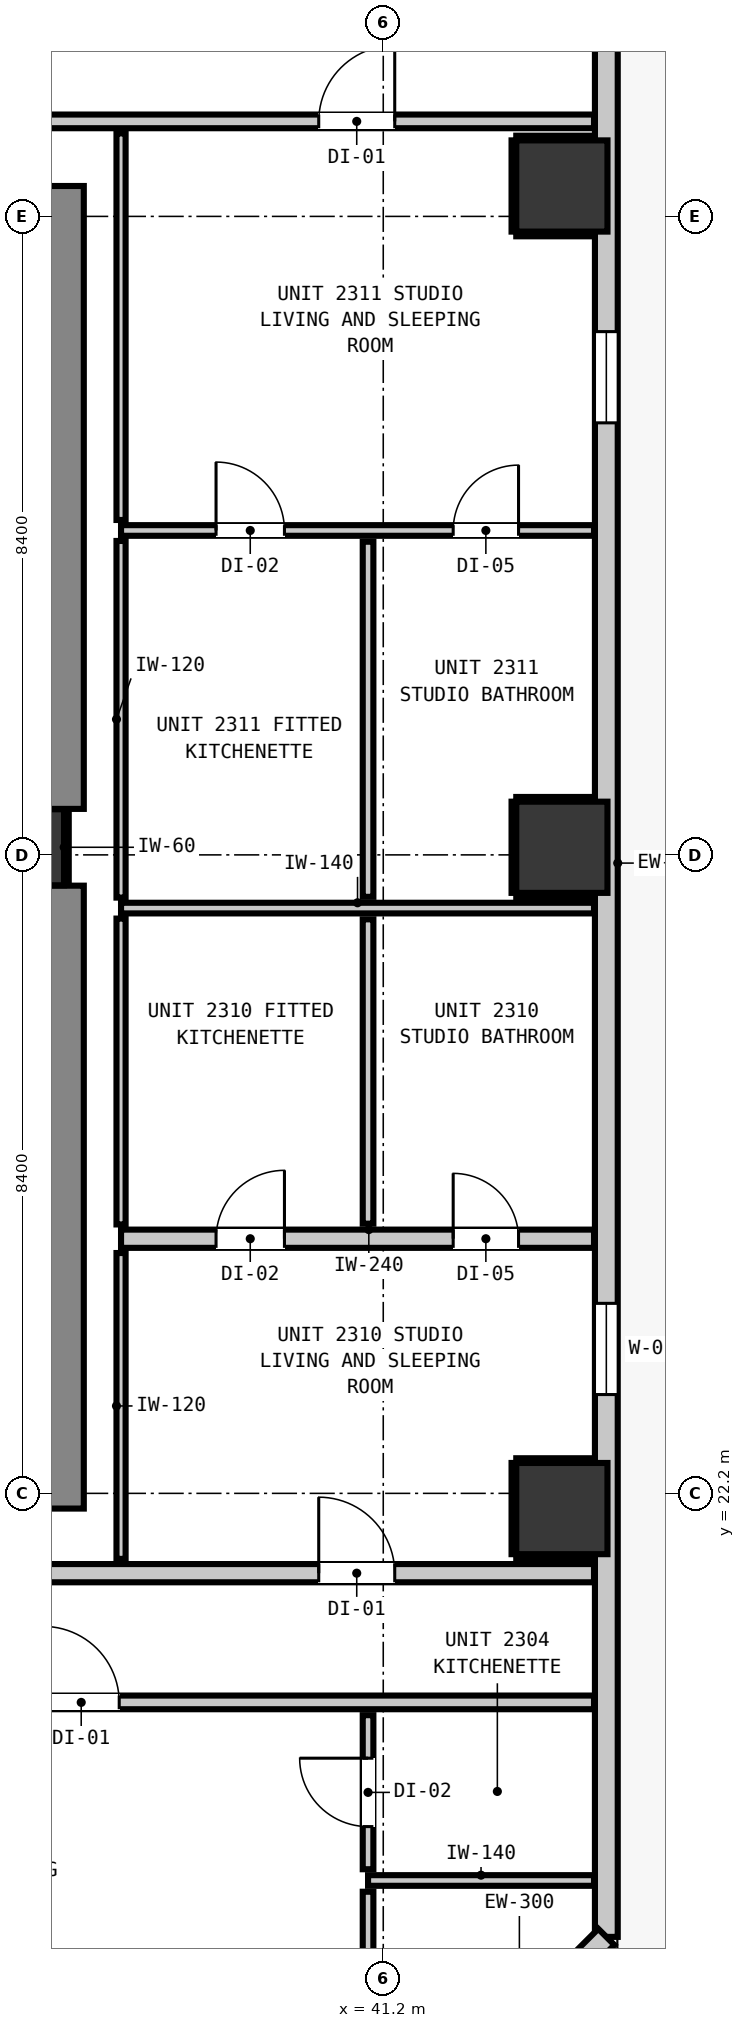
"""IFC4 building model, lengths in metres.
Left out: names, types, materials, properties, quantities, classifications, styles, units other than length and angle.
Written with IfcOpenShell. Run it as: python <this file> out.ifc"""

import sys

from ifc_helpers import new_model, si_unit, direction, frame, frame_2d, origin, origin_2d, place, context, subcontext, project, spatial, rectangle, extrude, element, fill, save


model = new_model("IFC4")
c1 = context("Model", 3, precision=1e-05, world=origin(), true_north=direction((0.0, 1.0)))
c2 = subcontext(c1, "Body", "Model", "MODEL_VIEW")
j1 = project(units=[si_unit("LENGTHUNIT", "METRE"), si_unit("PLANEANGLEUNIT", "RADIAN")], contexts=[c1])
p1 = place(None, origin())
s1 = spatial("IfcSite", under=j1, at=p1, CompositionType="ELEMENT")
p2 = place(p1, origin())
s2 = spatial("IfcBuilding", under=s1, at=p2, CompositionType="ELEMENT")
p3 = place(p2, frame((0.0, 0.0, 81.76)))
s3 = spatial("IfcBuildingStorey", under=s2, at=p3, CompositionType="ELEMENT", Elevation=81.76)
p4 = place(p3, frame((36.5, 30.7, 0.0), z_axis=(0.0, 0.0, 1.0), x_axis=(1.0, 0.0, 0.0)))
e1 = element("IfcColumn", 1, at=p4, inside=s3, PredefinedType="COLUMN", context=c2, shape_type="SweptSolid", body=[
    extrude(rectangle(XDim=1.0, YDim=1.0, at=origin_2d()), origin(), (0.0, 0.0, 1.0), 3.32),
])
p5 = place(p3, frame((36.66, 22.0, 0.0), z_axis=(0.0, 0.0, 1.0), x_axis=(0.0, 1.0, 0.0)))
e2 = element("IfcWall", 2, at=p5, inside=s3, PredefinedType="SHEAR", context=c2, shape_type="SweptSolid", body=[
    extrude(rectangle(XDim=8.195, YDim=1.2, at=frame_2d((4.098, 0.0))), origin(), (0.0, 0.0, 1.0), 3.32),
])
p6 = place(p3, frame((36.66, 31.205, 0.0), z_axis=(0.0, 0.0, 1.0), x_axis=(0.0, 1.0, 0.0)))
e3 = element("IfcWall", 3, at=p6, inside=s3, PredefinedType="SHEAR", context=c2, shape_type="SweptSolid", body=[
    extrude(rectangle(XDim=8.195, YDim=1.2, at=frame_2d((4.097, 0.0))), origin(), (0.0, 0.0, 1.0), 3.32),
])
for number, where, z_axis, x_axis in (
    (4, (43.55, 22.0, -0.2), (0.0, 0.0, 1.0), (1.0, 0.0, 0.0)),
    (5, (43.55, 30.7, -0.2), (0.0, 0.0, 1.0), (1.0, 0.0, 0.0)),
    (6, (43.55, 39.4, -0.2), (0.0, 0.0, 1.0), (1.0, 0.0, 0.0)),
):
    element("IfcColumn", number, at=place(p3, frame(where, z_axis=z_axis, x_axis=x_axis)), inside=s3, PredefinedType="COLUMN", context=c2, shape_type="SweptSolid", body=[
        extrude(rectangle(XDim=1.2, YDim=1.2, at=origin_2d()), origin(), (0.0, 0.0, 1.0), 3.52),
    ])
p7 = place(p3, frame((44.135, 51.035, 0.0), z_axis=(0.0, 0.0, 1.0), x_axis=(0.0, -1.0, 0.0)))
e7 = element("IfcWall", 7, at=p7, inside=s3, PredefinedType="STANDARD", context=c2, shape_type="SweptSolid", body=[
    extrude(rectangle(XDim=34.67, YDim=0.3, at=frame_2d((17.335, 0.0))), origin(), (0.0, 0.0, 1.0), 3.06),
])
p8 = place(p7, frame((0.501, 0.0, 0.0)))
e8 = element("IfcOpeningElement", 8, at=p8, cuts=e7, PredefinedType="OPENING", context=c2, shape_type="SweptSolid", body=[
    extrude(rectangle(XDim=1.1, YDim=2.15, at=frame_2d((0.55, 1.075))), frame((0.0, 0.16, 0.0), z_axis=(0.0, -1.0, 0.0), x_axis=(1.0, 0.0, 0.0)), (0.0, 0.0, 1.0), 0.32),
])
p9 = place(p7, frame((1.978, 0.0, 0.85)))
e9 = element("IfcOpeningElement", 9, at=p9, cuts=e7, PredefinedType="OPENING", context=c2, shape_type="SweptSolid", body=[
    extrude(rectangle(XDim=0.58, YDim=1.5, at=frame_2d((0.29, 0.75))), frame((0.0, 0.16, 0.0), z_axis=(0.0, -1.0, 0.0), x_axis=(1.0, 0.0, 0.0)), (0.0, 0.0, 1.0), 0.32),
])
p10 = place(p7, frame((26.335, 0.0, 0.85)))
e10 = element("IfcOpeningElement", 10, at=p10, cuts=e7, PredefinedType="OPENING", context=c2, shape_type="SweptSolid", body=[
    extrude(rectangle(XDim=1.2, YDim=1.8, at=frame_2d((0.6, 0.9))), frame((0.0, 0.16, 0.0), z_axis=(0.0, -1.0, 0.0), x_axis=(1.0, 0.0, 0.0)), (0.0, 0.0, 1.0), 0.32),
])
p11 = place(p7, frame((13.551, 0.0, 0.85)))
e11 = element("IfcOpeningElement", 11, at=p11, cuts=e7, PredefinedType="OPENING", context=c2, shape_type="SweptSolid", body=[
    extrude(rectangle(XDim=1.2, YDim=1.8, at=frame_2d((0.6, 0.9))), frame((0.0, 0.16, 0.0), z_axis=(0.0, -1.0, 0.0), x_axis=(1.0, 0.0, 0.0)), (0.0, 0.0, 1.0), 0.32),
])
p12 = place(p3, frame((44.135, 16.365, 0.0), z_axis=(0.0, 0.0, 1.0), x_axis=(-0.707106781187, -0.707106781187, 0.0)))
e12 = element("IfcWall", 12, at=p12, inside=s3, PredefinedType="STANDARD", context=c2, shape_type="SweptSolid", body=[
    extrude(rectangle(XDim=3.536, YDim=0.3, at=frame_2d((1.768, 0.0))), origin(), (0.0, 0.0, 1.0), 3.06),
])
p13 = place(p3, frame((12.993, 21.15, 0.0), z_axis=(0.0, 0.0, 1.0), x_axis=(1.0, 0.0, 0.0)))
e13 = element("IfcWall", 13, at=p13, inside=s3, PredefinedType="PARTITIONING", context=c2, shape_type="SweptSolid", body=[
    extrude(rectangle(XDim=30.98, YDim=0.24, at=frame_2d((15.49, 0.0))), origin(), (0.0, 0.0, 1.0), 3.06),
])
p14 = place(p13, frame((5.217, 0.0, 0.0)))
e14 = element("IfcOpeningElement", 14, at=p14, cuts=e13, PredefinedType="OPENING", context=c2, shape_type="SweptSolid", body=[
    extrude(rectangle(XDim=1.1, YDim=2.15, at=frame_2d((0.55, 1.075))), frame((0.0, 0.13, 0.0), z_axis=(0.0, -1.0, 0.0), x_axis=(1.0, 0.0, 0.0)), (0.0, 0.0, 1.0), 0.26),
])
p15 = place(p13, frame((27.358, 0.0, 0.0)))
e15 = element("IfcOpeningElement", 15, at=p15, cuts=e13, PredefinedType="OPENING", context=c2, shape_type="SweptSolid", body=[
    extrude(rectangle(XDim=1.0, YDim=2.15, at=frame_2d((0.5, 1.075))), frame((0.0, 0.13, 0.0), z_axis=(0.0, -1.0, 0.0), x_axis=(1.0, 0.0, 0.0)), (0.0, 0.0, 1.0), 0.26),
])
p16 = place(p3, frame((37.75, 25.55, 0.0), z_axis=(0.0, 0.0, 1.0), x_axis=(1.0, 0.0, 0.0)))
e16 = element("IfcWall", 16, at=p16, inside=s3, PredefinedType="PARTITIONING", context=c2, shape_type="SweptSolid", body=[
    extrude(rectangle(XDim=6.223, YDim=0.24, at=frame_2d((3.111, 0.0))), origin(), (0.0, 0.0, 1.0), 3.06),
])
p17 = place(p16, frame((1.25, 0.0, 0.0)))
e17 = element("IfcOpeningElement", 17, at=p17, cuts=e16, PredefinedType="OPENING", context=c2, shape_type="SweptSolid", body=[
    extrude(rectangle(XDim=0.9, YDim=2.1, at=frame_2d((0.45, 1.05))), frame((0.0, 0.13, 0.0), z_axis=(0.0, -1.0, 0.0), x_axis=(1.0, 0.0, 0.0)), (0.0, 0.0, 1.0), 0.26),
])
p18 = place(p16, frame((4.37, 0.0, 0.0)))
e18 = element("IfcOpeningElement", 18, at=p18, cuts=e16, PredefinedType="OPENING", context=c2, shape_type="SweptSolid", body=[
    extrude(rectangle(XDim=0.86, YDim=2.02, at=frame_2d((0.43, 1.01))), frame((0.0, 0.13, 0.0), z_axis=(0.0, -1.0, 0.0), x_axis=(1.0, 0.0, 0.0)), (0.0, 0.0, 1.0), 0.26),
])
p19 = place(p3, frame((12.993, 19.45, 0.0), z_axis=(0.0, 0.0, 1.0), x_axis=(1.0, 0.0, 0.0)))
e19 = element("IfcWall", 19, at=p19, inside=s3, PredefinedType="PARTITIONING", context=c2, shape_type="SweptSolid", body=[
    extrude(rectangle(XDim=30.98, YDim=0.18, at=frame_2d((15.49, 0.0))), origin(), (0.0, 0.0, 1.0), 3.06),
])
p20 = place(p19, frame((6.788, 0.0, 0.0)))
e20 = element("IfcOpeningElement", 20, at=p20, cuts=e19, PredefinedType="OPENING", context=c2, shape_type="SweptSolid", body=[
    extrude(rectangle(XDim=1.0, YDim=2.15, at=frame_2d((0.5, 1.075))), frame((0.0, 0.1, 0.0), z_axis=(0.0, -1.0, 0.0), x_axis=(1.0, 0.0, 0.0)), (0.0, 0.0, 1.0), 0.2),
])
p21 = place(p19, frame((16.356, 0.0, 0.0)))
e21 = element("IfcOpeningElement", 21, at=p21, cuts=e19, PredefinedType="OPENING", context=c2, shape_type="SweptSolid", body=[
    extrude(rectangle(XDim=1.0, YDim=2.15, at=frame_2d((0.5, 1.075))), frame((0.0, 0.1, 0.0), z_axis=(0.0, -1.0, 0.0), x_axis=(1.0, 0.0, 0.0)), (0.0, 0.0, 1.0), 0.2),
])
p22 = place(p19, frame((23.733, 0.0, 0.0)))
e22 = element("IfcOpeningElement", 22, at=p22, cuts=e19, PredefinedType="OPENING", context=c2, shape_type="SweptSolid", body=[
    extrude(rectangle(XDim=1.0, YDim=2.15, at=frame_2d((0.5, 1.075))), frame((0.0, 0.1, 0.0), z_axis=(0.0, -1.0, 0.0), x_axis=(1.0, 0.0, 0.0)), (0.0, 0.0, 1.0), 0.2),
])
p23 = place(p3, frame((1.827, 40.25, 0.0), z_axis=(0.0, 0.0, 1.0), x_axis=(1.0, 0.0, 0.0)))
e23 = element("IfcWall", 23, at=p23, inside=s3, PredefinedType="PARTITIONING", context=c2, shape_type="SweptSolid", body=[
    extrude(rectangle(XDim=42.146, YDim=0.18, at=frame_2d((21.073, 0.0))), origin(), (0.0, 0.0, 1.0), 3.06),
])
p24 = place(p23, frame((15.608, 0.0, 0.0)))
e24 = element("IfcOpeningElement", 24, at=p24, cuts=e23, PredefinedType="OPENING", context=c2, shape_type="SweptSolid", body=[
    extrude(rectangle(XDim=1.4, YDim=2.15, at=frame_2d((0.7, 1.075))), frame((0.0, 0.1, 0.0), z_axis=(0.0, -1.0, 0.0), x_axis=(1.0, 0.0, 0.0)), (0.0, 0.0, 1.0), 0.2),
])
p25 = place(p23, frame((8.647, 0.0, 0.0)))
e25 = element("IfcOpeningElement", 25, at=p25, cuts=e23, PredefinedType="OPENING", context=c2, shape_type="SweptSolid", body=[
    extrude(rectangle(XDim=1.4, YDim=2.15, at=frame_2d((0.7, 1.075))), frame((0.0, 0.1, 0.0), z_axis=(0.0, -1.0, 0.0), x_axis=(1.0, 0.0, 0.0)), (0.0, 0.0, 1.0), 0.2),
])
p26 = place(p23, frame((38.524, 0.0, 0.0)))
e26 = element("IfcOpeningElement", 26, at=p26, cuts=e23, PredefinedType="OPENING", context=c2, shape_type="SweptSolid", body=[
    extrude(rectangle(XDim=1.0, YDim=2.15, at=frame_2d((0.5, 1.075))), frame((0.0, 0.1, 0.0), z_axis=(0.0, -1.0, 0.0), x_axis=(1.0, 0.0, 0.0)), (0.0, 0.0, 1.0), 0.2),
])
p27 = place(p3, frame((41.0, 17.107, 0.0), z_axis=(0.0, 0.0, 1.0), x_axis=(1.0, 0.0, 0.0)))
e27 = element("IfcWall", 27, at=p27, inside=s3, PredefinedType="PARTITIONING", context=c2, shape_type="SweptSolid", body=[
    extrude(rectangle(XDim=2.973, YDim=0.14, at=frame_2d((1.486, 0.0))), origin(), (0.0, 0.0, 1.0), 3.06),
])
p28 = place(p3, frame((37.75, 29.9, 0.0), z_axis=(0.0, 0.0, 1.0), x_axis=(1.0, 0.0, 0.0)))
e28 = element("IfcWall", 28, at=p28, inside=s3, PredefinedType="PARTITIONING", context=c2, shape_type="SweptSolid", body=[
    extrude(rectangle(XDim=6.223, YDim=0.14, at=frame_2d((3.111, 0.0))), origin(), (0.0, 0.0, 1.0), 3.06),
])
p29 = place(p3, frame((37.75, 34.868, 0.0), z_axis=(0.0, 0.0, 1.0), x_axis=(1.0, 0.0, 0.0)))
e29 = element("IfcWall", 29, at=p29, inside=s3, PredefinedType="PARTITIONING", context=c2, shape_type="SweptSolid", body=[
    extrude(rectangle(XDim=6.223, YDim=0.14, at=frame_2d((3.111, 0.0))), origin(), (0.0, 0.0, 1.0), 3.06),
])
p30 = place(p29, frame((1.25, 0.0, 0.0)))
e30 = element("IfcOpeningElement", 30, at=p30, cuts=e29, PredefinedType="OPENING", context=c2, shape_type="SweptSolid", body=[
    extrude(rectangle(XDim=0.9, YDim=2.1, at=frame_2d((0.45, 1.05))), frame((0.0, 0.08, 0.0), z_axis=(0.0, -1.0, 0.0), x_axis=(1.0, 0.0, 0.0)), (0.0, 0.0, 1.0), 0.16),
])
p31 = place(p29, frame((4.37, 0.0, 0.0)))
e31 = element("IfcOpeningElement", 31, at=p31, cuts=e29, PredefinedType="OPENING", context=c2, shape_type="SweptSolid", body=[
    extrude(rectangle(XDim=0.86, YDim=2.02, at=frame_2d((0.43, 1.01))), frame((0.0, 0.08, 0.0), z_axis=(0.0, -1.0, 0.0), x_axis=(1.0, 0.0, 0.0)), (0.0, 0.0, 1.0), 0.16),
])
p32 = place(p3, frame((41.0, 14.027, 0.0), z_axis=(0.0, 0.0, 1.0), x_axis=(0.0, 1.0, 0.0)))
e32 = element("IfcWall", 32, at=p32, inside=s3, PredefinedType="PARTITIONING", context=c2, shape_type="SweptSolid", body=[
    extrude(rectangle(XDim=2.932, YDim=0.14, at=frame_2d((1.466, 0.0))), origin(), (0.0, 0.0, 1.0), 3.06),
])
p33 = place(p32, frame((1.109, 0.0, 0.0)))
e33 = element("IfcOpeningElement", 33, at=p33, cuts=e32, PredefinedType="OPENING", context=c2, shape_type="SweptSolid", body=[
    extrude(rectangle(XDim=0.86, YDim=2.02, at=frame_2d((0.43, 1.01))), frame((0.0, 0.08, 0.0), z_axis=(0.0, -1.0, 0.0), x_axis=(1.0, 0.0, 0.0)), (0.0, 0.0, 1.0), 0.16),
])
p34 = place(p3, frame((41.0, 17.255, 0.0), z_axis=(0.0, 0.0, 1.0), x_axis=(0.0, 1.0, 0.0)))
e34 = element("IfcWall", 34, at=p34, inside=s3, PredefinedType="PARTITIONING", context=c2, shape_type="SweptSolid", body=[
    extrude(rectangle(XDim=2.027, YDim=0.14, at=frame_2d((1.014, 0.0))), origin(), (0.0, 0.0, 1.0), 3.06),
])
p35 = place(p34, frame((0.561, 0.0, 0.0)))
e35 = element("IfcOpeningElement", 35, at=p35, cuts=e34, PredefinedType="OPENING", context=c2, shape_type="SweptSolid", body=[
    extrude(rectangle(XDim=0.9, YDim=2.1, at=frame_2d((0.45, 1.05))), frame((0.0, 0.08, 0.0), z_axis=(0.0, -1.0, 0.0), x_axis=(1.0, 0.0, 0.0)), (0.0, 0.0, 1.0), 0.16),
])
p36 = place(p3, frame((41.0, 25.748, 0.0), z_axis=(0.0, 0.0, 1.0), x_axis=(0.0, 1.0, 0.0)))
e36 = element("IfcWall", 36, at=p36, inside=s3, PredefinedType="PARTITIONING", context=c2, shape_type="SweptSolid", body=[
    extrude(rectangle(XDim=4.004, YDim=0.14, at=frame_2d((2.002, 0.0))), origin(), (0.0, 0.0, 1.0), 3.06),
])
p37 = place(p3, frame((41.0, 30.048, 0.0), z_axis=(0.0, 0.0, 1.0), x_axis=(0.0, 1.0, 0.0)))
e37 = element("IfcWall", 37, at=p37, inside=s3, PredefinedType="PARTITIONING", context=c2, shape_type="SweptSolid", body=[
    extrude(rectangle(XDim=4.672, YDim=0.14, at=frame_2d((2.336, 0.0))), origin(), (0.0, 0.0, 1.0), 3.06),
])
p38 = place(p3, frame((37.75, 21.338, 0.0), z_axis=(0.0, 0.0, 1.0), x_axis=(0.0, 1.0, 0.0)))
e38 = element("IfcWall", 38, at=p38, inside=s3, PredefinedType="PARTITIONING", context=c2, shape_type="SweptSolid", body=[
    extrude(rectangle(XDim=4.024, YDim=0.12, at=frame_2d((2.012, 0.0))), origin(), (0.0, 0.0, 1.0), 3.06),
])
p39 = place(p3, frame((37.75, 25.738, 0.0), z_axis=(0.0, 0.0, 1.0), x_axis=(0.0, 1.0, 0.0)))
e39 = element("IfcWall", 39, at=p39, inside=s3, PredefinedType="PARTITIONING", context=c2, shape_type="SweptSolid", body=[
    extrude(rectangle(XDim=4.024, YDim=0.12, at=frame_2d((2.012, 0.0))), origin(), (0.0, 0.0, 1.0), 3.06),
])
p40 = place(p3, frame((37.75, 30.038, 0.0), z_axis=(0.0, 0.0, 1.0), x_axis=(0.0, 1.0, 0.0)))
e40 = element("IfcWall", 40, at=p40, inside=s3, PredefinedType="PARTITIONING", context=c2, shape_type="SweptSolid", body=[
    extrude(rectangle(XDim=4.692, YDim=0.12, at=frame_2d((2.346, 0.0))), origin(), (0.0, 0.0, 1.0), 3.06),
])
p41 = place(p3, frame((37.75, 35.006, 0.0), z_axis=(0.0, 0.0, 1.0), x_axis=(0.0, 1.0, 0.0)))
e41 = element("IfcWall", 41, at=p41, inside=s3, PredefinedType="PARTITIONING", context=c2, shape_type="SweptSolid", body=[
    extrude(rectangle(XDim=5.086, YDim=0.12, at=frame_2d((2.543, 0.0))), origin(), (0.0, 0.0, 1.0), 3.06),
])
p42 = place(p3, frame((37.032, 30.21, 0.0), z_axis=(0.0, 0.0, 1.0), x_axis=(0.0, 1.0, 0.0)))
e42 = element("IfcWall", 42, at=p42, inside=s3, PredefinedType="PARTITIONING", context=c2, shape_type="SweptSolid", body=[
    extrude(rectangle(XDim=0.98, YDim=0.06, at=frame_2d((0.49, 0.0))), origin(), (0.0, 0.0, 1.0), 1.45),
])
for number, where, z_axis, x_axis in (
    (43, (42.95, 21.368, 0.0), (0.0, 0.0, 1.0), (1.0, 0.0, 0.0)),
    (44, (42.95, 22.632, 0.0), (0.0, 0.0, 1.0), (1.0, 0.0, 0.0)),
):
    element("IfcWall", number, at=place(p3, frame(where, z_axis=z_axis, x_axis=x_axis)), inside=s3, PredefinedType="PARTITIONING", context=c2, shape_type="SweptSolid", body=[
        extrude(rectangle(XDim=1.02, YDim=0.06, at=frame_2d((0.51, 0.0))), origin(), (0.0, 0.0, 1.0), 1.45),
    ])
p43 = place(p3, frame((42.918, 21.4, 0.0), z_axis=(0.0, 0.0, 1.0), x_axis=(0.0, 1.0, 0.0)))
e45 = element("IfcWall", 45, at=p43, inside=s3, PredefinedType="PARTITIONING", context=c2, shape_type="SweptSolid", body=[
    extrude(rectangle(XDim=1.2, YDim=0.06, at=frame_2d((0.6, 0.0))), origin(), (0.0, 0.0, 1.0), 1.45),
])
for number, where, z_axis, x_axis in (
    (46, (42.95, 30.068, 0.0), (0.0, 0.0, 1.0), (1.0, 0.0, 0.0)),
    (47, (42.95, 31.332, 0.0), (0.0, 0.0, 1.0), (1.0, 0.0, 0.0)),
):
    element("IfcWall", number, at=place(p3, frame(where, z_axis=z_axis, x_axis=x_axis)), inside=s3, PredefinedType="PARTITIONING", context=c2, shape_type="SweptSolid", body=[
        extrude(rectangle(XDim=1.02, YDim=0.06, at=frame_2d((0.51, 0.0))), origin(), (0.0, 0.0, 1.0), 1.45),
    ])
p44 = place(p3, frame((42.918, 30.1, 0.0), z_axis=(0.0, 0.0, 1.0), x_axis=(0.0, 1.0, 0.0)))
e48 = element("IfcWall", 48, at=p44, inside=s3, PredefinedType="PARTITIONING", context=c2, shape_type="SweptSolid", body=[
    extrude(rectangle(XDim=1.2, YDim=0.06, at=frame_2d((0.6, 0.0))), origin(), (0.0, 0.0, 1.0), 1.45),
])
for number, where, z_axis, x_axis in (
    (49, (42.95, 38.768, 0.0), (0.0, 0.0, 1.0), (1.0, 0.0, 0.0)),
    (50, (42.95, 40.032, 0.0), (0.0, 0.0, 1.0), (1.0, 0.0, 0.0)),
):
    element("IfcWall", number, at=place(p3, frame(where, z_axis=z_axis, x_axis=x_axis)), inside=s3, PredefinedType="PARTITIONING", context=c2, shape_type="SweptSolid", body=[
        extrude(rectangle(XDim=1.02, YDim=0.06, at=frame_2d((0.51, 0.0))), origin(), (0.0, 0.0, 1.0), 1.45),
    ])
p45 = place(p3, frame((42.918, 38.8, 0.0), z_axis=(0.0, 0.0, 1.0), x_axis=(0.0, 1.0, 0.0)))
e51 = element("IfcWall", 51, at=p45, inside=s3, PredefinedType="PARTITIONING", context=c2, shape_type="SweptSolid", body=[
    extrude(rectangle(XDim=1.2, YDim=0.06, at=frame_2d((0.6, 0.0))), origin(), (0.0, 0.0, 1.0), 1.45),
])
p46 = place(p10, origin())
e52 = element("IfcWindow", 52, at=p46, inside=s3, PartitioningType="SINGLE_PANEL", PredefinedType="WINDOW", context=c2, shape_type="SweptSolid", body=[
    extrude(rectangle(XDim=1.2, YDim=1.8, at=frame_2d((0.6, 0.9))), frame((0.0, 0.03, 0.0), z_axis=(0.0, -1.0, 0.0), x_axis=(1.0, 0.0, 0.0)), (0.0, 0.0, 1.0), 0.06),
])
fill(e10, e52)
p47 = place(p11, origin())
e53 = element("IfcWindow", 53, at=p47, inside=s3, PartitioningType="SINGLE_PANEL", PredefinedType="WINDOW", context=c2, shape_type="SweptSolid", body=[
    extrude(rectangle(XDim=1.2, YDim=1.8, at=frame_2d((0.6, 0.9))), frame((0.0, 0.03, 0.0), z_axis=(0.0, -1.0, 0.0), x_axis=(1.0, 0.0, 0.0)), (0.0, 0.0, 1.0), 0.06),
])
fill(e11, e53)
p48 = place(p22, origin())
e54 = element("IfcDoor", 54, at=p48, inside=s3, OperationType="SINGLE_SWING_LEFT", PredefinedType="DOOR", context=c2, shape_type="SweptSolid", body=[
    extrude(rectangle(XDim=1.0, YDim=2.15, at=frame_2d((0.5, 1.075))), frame((0.0, 0.025, 0.0), z_axis=(0.0, -1.0, 0.0), x_axis=(1.0, 0.0, 0.0)), (0.0, 0.0, 1.0), 0.05),
])
fill(e22, e54)
p49 = place(p35, origin())
e55 = element("IfcDoor", 55, at=p49, inside=s3, OperationType="SINGLE_SWING_RIGHT", PredefinedType="DOOR", context=c2, shape_type="SweptSolid", body=[
    extrude(rectangle(XDim=0.9, YDim=2.1, at=frame_2d((0.45, 1.05))), frame((0.0, 0.025, 0.0), z_axis=(0.0, -1.0, 0.0), x_axis=(1.0, 0.0, 0.0)), (0.0, 0.0, 1.0), 0.05),
])
fill(e35, e55)
p50 = place(p15, origin())
e56 = element("IfcDoor", 56, at=p50, inside=s3, OperationType="SINGLE_SWING_LEFT", PredefinedType="DOOR", context=c2, shape_type="SweptSolid", body=[
    extrude(rectangle(XDim=1.0, YDim=2.15, at=frame_2d((0.5, 1.075))), frame((0.0, 0.025, 0.0), z_axis=(0.0, -1.0, 0.0), x_axis=(1.0, 0.0, 0.0)), (0.0, 0.0, 1.0), 0.05),
])
fill(e15, e56)
p51 = place(p17, origin())
e57 = element("IfcDoor", 57, at=p51, inside=s3, OperationType="SINGLE_SWING_RIGHT", PredefinedType="DOOR", context=c2, shape_type="SweptSolid", body=[
    extrude(rectangle(XDim=0.9, YDim=2.1, at=frame_2d((0.45, 1.05))), frame((0.0, 0.025, 0.0), z_axis=(0.0, -1.0, 0.0), x_axis=(1.0, 0.0, 0.0)), (0.0, 0.0, 1.0), 0.05),
])
fill(e17, e57)
p52 = place(p18, origin())
e58 = element("IfcDoor", 58, at=p52, inside=s3, OperationType="SINGLE_SWING_LEFT", PredefinedType="DOOR", context=c2, shape_type="SweptSolid", body=[
    extrude(rectangle(XDim=0.86, YDim=2.02, at=frame_2d((0.43, 1.01))), frame((0.0, 0.025, 0.0), z_axis=(0.0, -1.0, 0.0), x_axis=(1.0, 0.0, 0.0)), (0.0, 0.0, 1.0), 0.05),
])
fill(e18, e58)
p53 = place(p26, origin())
e59 = element("IfcDoor", 59, at=p53, inside=s3, OperationType="SINGLE_SWING_RIGHT", PredefinedType="DOOR", context=c2, shape_type="SweptSolid", body=[
    extrude(rectangle(XDim=1.0, YDim=2.15, at=frame_2d((0.5, 1.075))), frame((0.0, 0.025, 0.0), z_axis=(0.0, -1.0, 0.0), x_axis=(1.0, 0.0, 0.0)), (0.0, 0.0, 1.0), 0.05),
])
fill(e26, e59)
p54 = place(p30, origin())
e60 = element("IfcDoor", 60, at=p54, inside=s3, OperationType="SINGLE_SWING_LEFT", PredefinedType="DOOR", context=c2, shape_type="SweptSolid", body=[
    extrude(rectangle(XDim=0.9, YDim=2.1, at=frame_2d((0.45, 1.05))), frame((0.0, 0.025, 0.0), z_axis=(0.0, -1.0, 0.0), x_axis=(1.0, 0.0, 0.0)), (0.0, 0.0, 1.0), 0.05),
])
fill(e30, e60)
p55 = place(p31, origin())
e61 = element("IfcDoor", 61, at=p55, inside=s3, OperationType="SINGLE_SWING_RIGHT", PredefinedType="DOOR", context=c2, shape_type="SweptSolid", body=[
    extrude(rectangle(XDim=0.86, YDim=2.02, at=frame_2d((0.43, 1.01))), frame((0.0, 0.025, 0.0), z_axis=(0.0, -1.0, 0.0), x_axis=(1.0, 0.0, 0.0)), (0.0, 0.0, 1.0), 0.05),
])
fill(e31, e61)
save(model, sys.argv[1])
